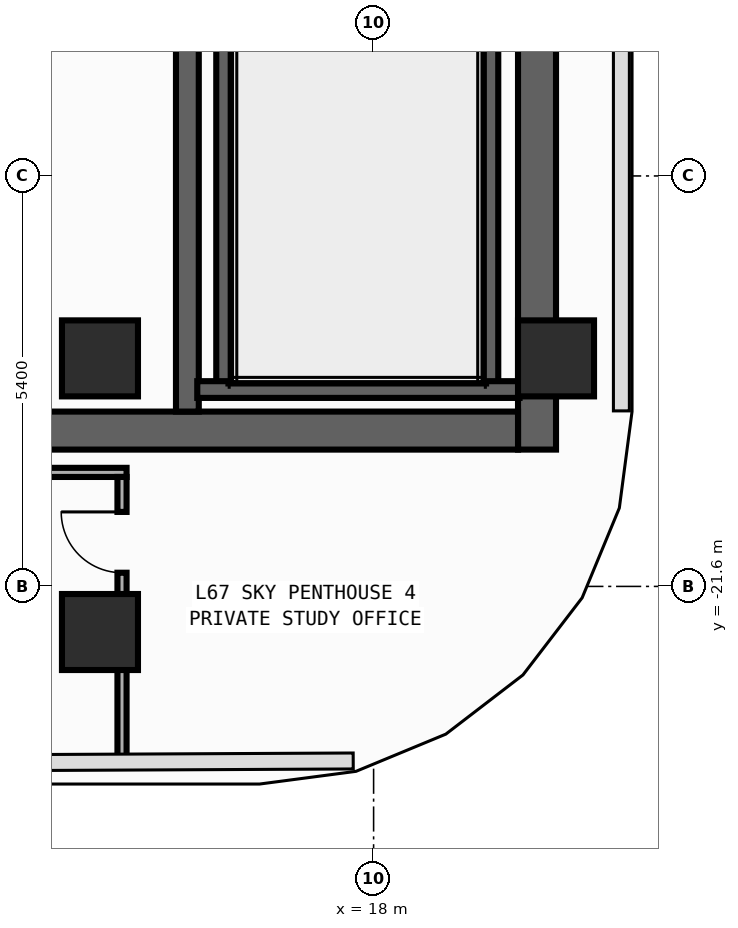
"""IFC4 building model, lengths in metres.
Left out: names, types, materials, properties, quantities, classifications, styles, units other than length and angle.
Written with IfcOpenShell. Run it as: python <this file> out.ifc"""

import sys

from ifc_helpers import new_model, si_unit, direction, frame, frame_2d, origin, origin_2d, place, context, subcontext, project, spatial, rectangle, circle, extrude, element, fill, save


model = new_model("IFC4")
c1 = context("Model", 3, precision=1e-05, world=origin(), true_north=direction((0.0, 1.0)))
c2 = subcontext(c1, "Body", "Model", "MODEL_VIEW")
j1 = project(units=[si_unit("LENGTHUNIT", "METRE"), si_unit("PLANEANGLEUNIT", "RADIAN")], contexts=[c1])
p1 = place(None, origin())
s1 = spatial("IfcSite", under=j1, at=p1, CompositionType="ELEMENT")
p2 = place(p1, origin())
s2 = spatial("IfcBuilding", under=s1, at=p2, CompositionType="ELEMENT")
p3 = place(p2, frame((0.0, 0.0, 281.4)))
s3 = spatial("IfcBuildingStorey", under=s2, at=p3, CompositionType="ELEMENT", Elevation=281.4)
p4 = place(p3, frame((20.15, -19.8, 0.0), z_axis=(0.0, 0.0, 1.0), x_axis=(0.0, 1.0, 0.0)))
e1 = element("IfcWall", 1, at=p4, inside=s3, PredefinedType="SHEAR", context=c2, shape_type="SweptSolid", body=[
    extrude(rectangle(XDim=27.0, YDim=0.5, at=frame_2d((13.5, 0.0))), origin(), (0.0, 0.0, 1.0), 3.54),
])
p5 = place(p3, frame((12.5, -19.55, 0.0), z_axis=(0.0, 0.0, 1.0), x_axis=(1.0, 0.0, 0.0)))
e2 = element("IfcWall", 2, at=p5, inside=s3, PredefinedType="SHEAR", context=c2, shape_type="SweptSolid", body=[
    extrude(rectangle(XDim=7.4, YDim=0.5, at=frame_2d((3.7, 0.0))), origin(), (0.0, 0.0, 1.0), 3.54),
])
p6 = place(p3, frame((15.55, -19.3, 0.0), z_axis=(0.0, 0.0, 1.0), x_axis=(0.0, 1.0, 0.0)))
e3 = element("IfcWall", 3, at=p6, inside=s3, PredefinedType="SHEAR", context=c2, shape_type="SweptSolid", body=[
    extrude(rectangle(XDim=26.0, YDim=0.3, at=frame_2d((13.0, 0.0))), origin(), (0.0, 0.0, 1.0), 3.54),
])
p7 = place(p6, frame((12.225, 0.0, 0.0)))
e4 = element("IfcOpeningElement", 4, at=p7, cuts=e3, PredefinedType="OPENING", context=c2, shape_type="SweptSolid", body=[
    extrude(rectangle(XDim=1.15, YDim=2.2, at=frame_2d((0.575, 1.1))), frame((0.0, 0.16, 0.0), z_axis=(0.0, -1.0, 0.0), x_axis=(1.0, 0.0, 0.0)), (0.0, 0.0, 1.0), 0.32),
])
p8 = place(p6, frame((24.625, 0.0, 0.0)))
e5 = element("IfcOpeningElement", 5, at=p8, cuts=e3, PredefinedType="OPENING", context=c2, shape_type="SweptSolid", body=[
    extrude(rectangle(XDim=0.85, YDim=2.1, at=frame_2d((0.425, 1.05))), frame((0.0, 0.16, 0.0), z_axis=(0.0, -1.0, 0.0), x_axis=(1.0, 0.0, 0.0)), (0.0, 0.0, 1.0), 0.32),
])
for number, where, z_axis, x_axis in (
    (6, (16.04, -19.01, 0.0), (0.0, 0.0, 1.0), (0.0, 1.0, 0.0)),
    (7, (19.53, -19.01, 0.0), (0.0, 0.0, 1.0), (0.0, 1.0, 0.0)),
):
    element("IfcWall", number, at=place(p3, frame(where, z_axis=z_axis, x_axis=x_axis)), inside=s3, PredefinedType="SHEAR", context=c2, shape_type="SweptSolid", body=[
        extrude(rectangle(XDim=11.42, YDim=0.22, at=frame_2d((5.71, 0.0))), origin(), (0.0, 0.0, 1.0), 3.54),
    ])
p9 = place(p3, frame((15.68, -19.01, 0.0), z_axis=(0.0, 0.0, 1.0), x_axis=(1.0, 0.0, 0.0)))
e8 = element("IfcWall", 8, at=p9, inside=s3, PredefinedType="SHEAR", context=c2, shape_type="SweptSolid", body=[
    extrude(rectangle(XDim=4.24, YDim=0.22, at=frame_2d((2.12, 0.0))), origin(), (0.0, 0.0, 1.0), 3.54),
])
for number, where, z_axis, x_axis in (
    (9, (20.4, -18.6, 0.0), (0.0, 0.0, 1.0), (1.0, 0.0, 0.0)),
    (10, (14.4, -18.6, 0.0), (0.0, 0.0, 1.0), (1.0, 0.0, 0.0)),
    (11, (14.4, -22.2, 0.0), (0.0, 0.0, 1.0), (1.0, 0.0, 0.0)),
):
    element("IfcColumn", number, at=place(p3, frame(where, z_axis=z_axis, x_axis=x_axis)), inside=s3, PredefinedType="COLUMN", context=c2, shape_type="SweptSolid", body=[
        extrude(circle(Radius=0.5, at=origin_2d()), origin(), (0.0, 0.0, 1.0), 3.8),
    ])
p10 = place(p3, frame((10.163, -20.1, 0.0), z_axis=(0.0, 0.0, 1.0), x_axis=(1.0, 0.0, 0.0)))
e12 = element("IfcWall", 12, at=p10, inside=s3, PredefinedType="PARTITIONING", context=c2, shape_type="SweptSolid", body=[
    extrude(rectangle(XDim=4.587, YDim=0.12, at=frame_2d((2.293, 0.0))), origin(), (0.0, 0.0, 1.0), 3.54),
])
p11 = place(p10, frame((0.861, 0.0, 0.0)))
e13 = element("IfcOpeningElement", 13, at=p11, cuts=e12, PredefinedType="OPENING", context=c2, shape_type="SweptSolid", body=[
    extrude(rectangle(XDim=0.86, YDim=2.15, at=frame_2d((0.43, 1.075))), frame((0.0, 0.07, 0.0), z_axis=(0.0, -1.0, 0.0), x_axis=(1.0, 0.0, 0.0)), (0.0, 0.0, 1.0), 0.14),
])
p12 = place(p3, frame((14.69, -23.906, 0.0), z_axis=(0.0, 0.0, 1.0), x_axis=(0.0, 1.0, 0.0)))
e14 = element("IfcWall", 14, at=p12, inside=s3, PredefinedType="PARTITIONING", context=c2, shape_type="SweptSolid", body=[
    extrude(rectangle(XDim=3.747, YDim=0.12, at=frame_2d((1.873, 0.0))), origin(), (0.0, 0.0, 1.0), 2.64),
])
p13 = place(p12, frame((2.486, 0.0, 0.0)))
e15 = element("IfcOpeningElement", 15, at=p13, cuts=e14, PredefinedType="OPENING", context=c2, shape_type="SweptSolid", body=[
    extrude(rectangle(XDim=0.8, YDim=2.1, at=frame_2d((0.4, 1.05))), frame((0.0, 0.07, 0.0), z_axis=(0.0, -1.0, 0.0), x_axis=(1.0, 0.0, 0.0)), (0.0, 0.0, 1.0), 0.14),
])
p14 = place(p13, origin())
e16 = element("IfcDoor", 16, at=p14, inside=s3, OperationType="SINGLE_SWING_RIGHT", PredefinedType="DOOR", context=c2, shape_type="SweptSolid", body=[
    extrude(rectangle(XDim=0.8, YDim=2.1, at=frame_2d((0.4, 1.05))), frame((0.0, 0.025, 0.0), z_axis=(0.0, -1.0, 0.0), x_axis=(1.0, 0.0, 0.0)), (0.0, 0.0, 1.0), 0.05),
])
fill(e15, e16)
save(model, sys.argv[1])
